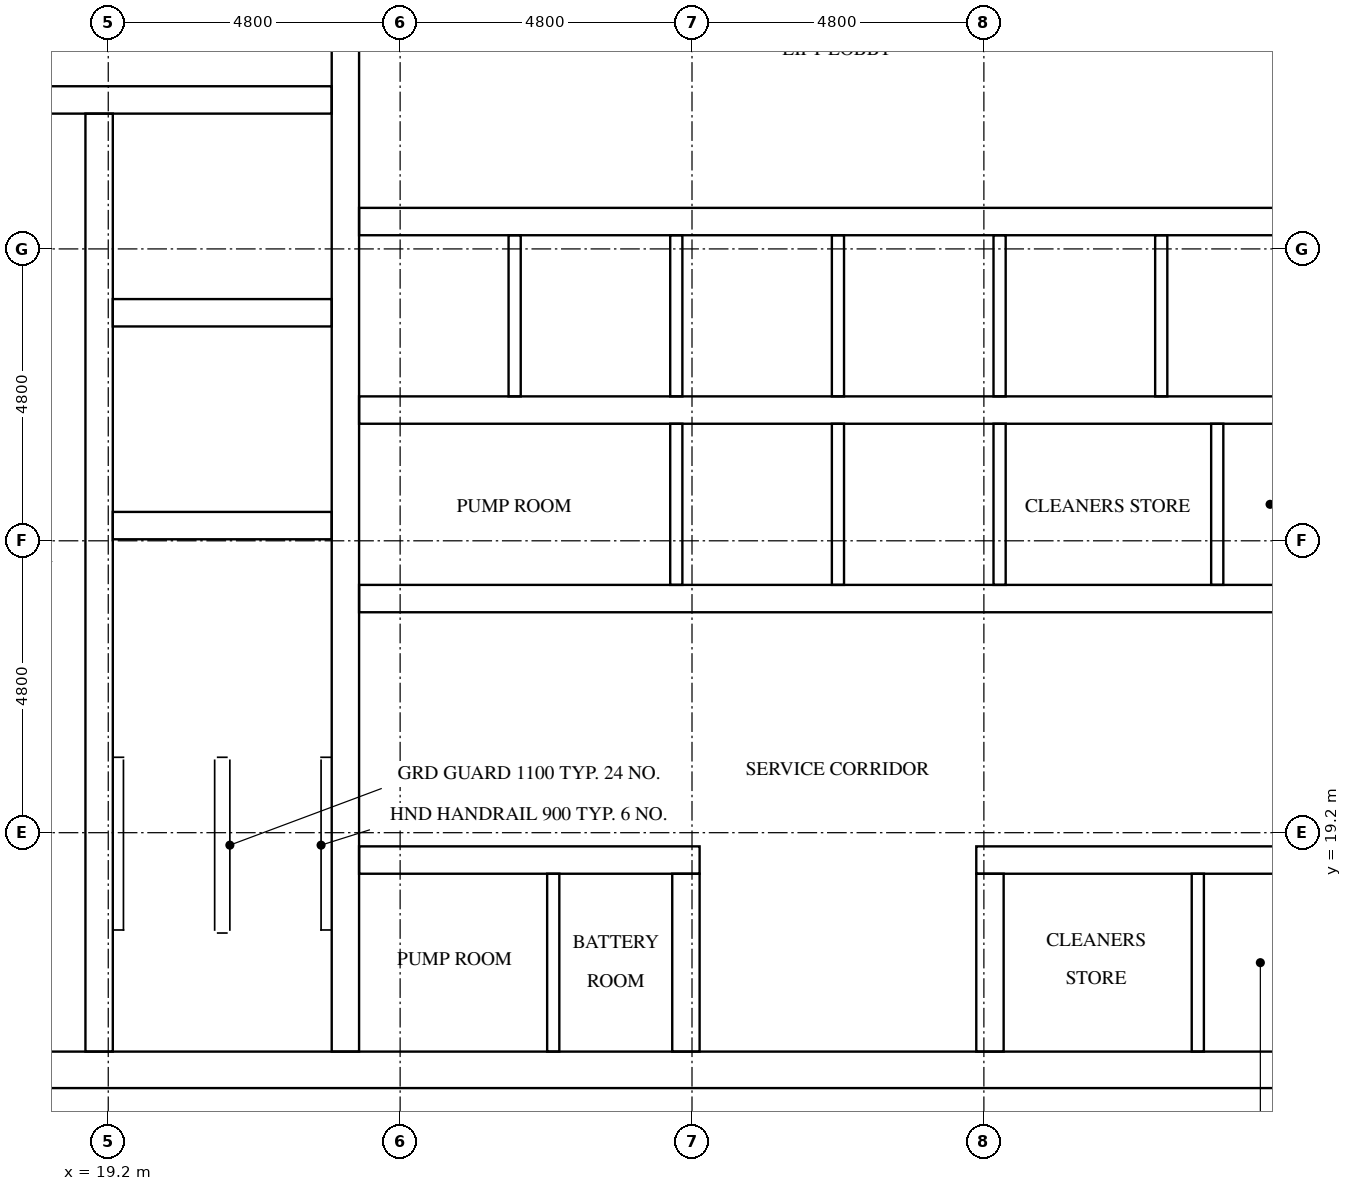
"""IFC4 building model, lengths in metres.
Left out: names, types, materials, properties, quantities, classifications, styles, units other than length and angle.
Written with IfcOpenShell. Run it as: python <this file> out.ifc"""

import sys

from ifc_helpers import new_model, si_unit, direction, frame, frame_2d, origin, place, context, subcontext, project, spatial, rectangle, extrude, element, fill, save


model = new_model("IFC4")
c1 = context("Model", 3, precision=1e-05, world=origin(), true_north=direction((0.0, 1.0)))
c2 = subcontext(c1, "Body", "Model", "MODEL_VIEW")
j1 = project(units=[si_unit("LENGTHUNIT", "METRE"), si_unit("PLANEANGLEUNIT", "RADIAN")], contexts=[c1])
p1 = place(None, origin())
s1 = spatial("IfcSite", under=j1, at=p1, CompositionType="ELEMENT")
p2 = place(p1, origin())
s2 = spatial("IfcBuilding", under=s1, at=p2, CompositionType="ELEMENT")
p3 = place(p2, frame((0.0, 0.0, 238.7)))
s3 = spatial("IfcBuildingStorey", under=s2, at=p3, CompositionType="ELEMENT", Elevation=238.7)
p4 = place(p3, frame((15.0, 15.3, 0.0), z_axis=(0.0, 0.0, 1.0), x_axis=(1.0, 0.0, 0.0)))
e1 = element("IfcWall", 1, at=p4, inside=s3, PredefinedType="SHEAR", context=c2, shape_type="SweptSolid", body=[
    extrude(rectangle(XDim=32.4, YDim=0.6, at=frame_2d((16.2, 0.0))), origin(), (0.0, 0.0, 1.0), 3.2),
])
p5 = place(p4, frame((15.3, 0.0, 0.0)))
e2 = element("IfcOpeningElement", 2, at=p5, cuts=e1, PredefinedType="OPENING", context=c2, shape_type="SweptSolid", body=[
    extrude(rectangle(XDim=1.8, YDim=2.1, at=frame_2d((0.9, 1.05))), frame((0.0, 0.31, 0.0), z_axis=(0.0, -1.0, 0.0), x_axis=(1.0, 0.0, 0.0)), (0.0, 0.0, 1.0), 0.62),
])
p6 = place(p3, frame((19.05, 15.6, 0.0), z_axis=(0.0, 0.0, 1.0), x_axis=(0.0, 1.0, 0.0)))
e3 = element("IfcWall", 3, at=p6, inside=s3, PredefinedType="SHEAR", context=c2, shape_type="SweptSolid", body=[
    extrude(rectangle(XDim=15.425, YDim=0.45, at=frame_2d((7.712, 0.0))), origin(), (0.0, 0.0, 1.0), 3.2),
])
p7 = place(p6, frame((9.85, 0.0, 0.0)))
e4 = element("IfcOpeningElement", 4, at=p7, cuts=e3, PredefinedType="OPENING", context=c2, shape_type="SweptSolid", body=[
    extrude(rectangle(XDim=1.1, YDim=2.1, at=frame_2d((0.55, 1.05))), frame((0.0, 0.235, 0.0), z_axis=(0.0, -1.0, 0.0), x_axis=(1.0, 0.0, 0.0)), (0.0, 0.0, 1.0), 0.47),
])
p8 = place(p6, frame((13.35, 0.0, 0.0)))
e5 = element("IfcOpeningElement", 5, at=p8, cuts=e3, PredefinedType="OPENING", context=c2, shape_type="SweptSolid", body=[
    extrude(rectangle(XDim=1.1, YDim=2.1, at=frame_2d((0.55, 1.05))), frame((0.0, 0.235, 0.0), z_axis=(0.0, -1.0, 0.0), x_axis=(1.0, 0.0, 0.0)), (0.0, 0.0, 1.0), 0.47),
])
p9 = place(p6, frame((0.6, 0.0, 0.0)))
e6 = element("IfcOpeningElement", 6, at=p9, cuts=e3, PredefinedType="OPENING", context=c2, shape_type="SweptSolid", body=[
    extrude(rectangle(XDim=1.2, YDim=2.1, at=frame_2d((0.6, 1.05))), frame((0.0, 0.235, 0.0), z_axis=(0.0, -1.0, 0.0), x_axis=(1.0, 0.0, 0.0)), (0.0, 0.0, 1.0), 0.47),
])
p10 = place(p3, frame((23.1, 15.6, 0.0), z_axis=(0.0, 0.0, 1.0), x_axis=(0.0, 1.0, 0.0)))
e7 = element("IfcWall", 7, at=p10, inside=s3, PredefinedType="SHEAR", context=c2, shape_type="SweptSolid", body=[
    extrude(rectangle(XDim=21.6, YDim=0.45, at=frame_2d((10.8, 0.0))), origin(), (0.0, 0.0, 1.0), 3.2),
])
for number, where, z_axis, x_axis in (
    (8, (19.275, 24.25, 0.0), (0.0, 0.0, 1.0), (1.0, 0.0, 0.0)),
    (9, (19.275, 27.75, 0.0), (0.0, 0.0, 1.0), (1.0, 0.0, 0.0)),
):
    element("IfcWall", number, at=place(p3, frame(where, z_axis=z_axis, x_axis=x_axis)), inside=s3, PredefinedType="SHEAR", context=c2, shape_type="SweptSolid", body=[
        extrude(rectangle(XDim=3.6, YDim=0.45, at=frame_2d((1.8, 0.0))), origin(), (0.0, 0.0, 1.0), 3.2),
    ])
p11 = place(p3, frame((15.6, 31.25, 0.0), z_axis=(0.0, 0.0, 1.0), x_axis=(1.0, 0.0, 0.0)))
e10 = element("IfcWall", 10, at=p11, inside=s3, PredefinedType="SHEAR", context=c2, shape_type="SweptSolid", body=[
    extrude(rectangle(XDim=7.275, YDim=0.45, at=frame_2d((3.637, 0.0))), origin(), (0.0, 0.0, 1.0), 3.2),
])
p12 = place(p3, frame((23.325, 18.75, 0.0), z_axis=(0.0, 0.0, 1.0), x_axis=(1.0, 0.0, 0.0)))
e11 = element("IfcWall", 11, at=p12, inside=s3, PredefinedType="SHEAR", context=c2, shape_type="SweptSolid", body=[
    extrude(rectangle(XDim=5.6, YDim=0.45, at=frame_2d((2.8, 0.0))), origin(), (0.0, 0.0, 1.0), 3.2),
])
p13 = place(p12, frame((1.046, 0.0, 0.0)))
e12 = element("IfcOpeningElement", 12, at=p13, cuts=e11, PredefinedType="OPENING", context=c2, shape_type="SweptSolid", body=[
    extrude(rectangle(XDim=1.0, YDim=2.1, at=frame_2d((0.5, 1.05))), frame((0.0, 0.235, 0.0), z_axis=(0.0, -1.0, 0.0), x_axis=(1.0, 0.0, 0.0)), (0.0, 0.0, 1.0), 0.47),
])
p14 = place(p12, frame((3.721, 0.0, 0.0)))
e13 = element("IfcOpeningElement", 13, at=p14, cuts=e11, PredefinedType="OPENING", context=c2, shape_type="SweptSolid", body=[
    extrude(rectangle(XDim=1.0, YDim=2.1, at=frame_2d((0.5, 1.05))), frame((0.0, 0.235, 0.0), z_axis=(0.0, -1.0, 0.0), x_axis=(1.0, 0.0, 0.0)), (0.0, 0.0, 1.0), 0.47),
])
p15 = place(p3, frame((33.475, 18.75, 0.0), z_axis=(0.0, 0.0, 1.0), x_axis=(1.0, 0.0, 0.0)))
e14 = element("IfcWall", 14, at=p15, inside=s3, PredefinedType="SHEAR", context=c2, shape_type="SweptSolid", body=[
    extrude(rectangle(XDim=5.6, YDim=0.45, at=frame_2d((2.8, 0.0))), origin(), (0.0, 0.0, 1.0), 3.2),
])
p16 = place(p15, frame((1.497, 0.0, 0.0)))
e15 = element("IfcOpeningElement", 15, at=p16, cuts=e14, PredefinedType="OPENING", context=c2, shape_type="SweptSolid", body=[
    extrude(rectangle(XDim=1.0, YDim=2.1, at=frame_2d((0.5, 1.05))), frame((0.0, 0.235, 0.0), z_axis=(0.0, -1.0, 0.0), x_axis=(1.0, 0.0, 0.0)), (0.0, 0.0, 1.0), 0.47),
])
p17 = place(p15, frame((4.171, 0.0, 0.0)))
e16 = element("IfcOpeningElement", 16, at=p17, cuts=e14, PredefinedType="OPENING", context=c2, shape_type="SweptSolid", body=[
    extrude(rectangle(XDim=1.0, YDim=2.1, at=frame_2d((0.5, 1.05))), frame((0.0, 0.235, 0.0), z_axis=(0.0, -1.0, 0.0), x_axis=(1.0, 0.0, 0.0)), (0.0, 0.0, 1.0), 0.47),
])
p18 = place(p3, frame((23.325, 23.05, 0.0), z_axis=(0.0, 0.0, 1.0), x_axis=(1.0, 0.0, 0.0)))
e17 = element("IfcWall", 17, at=p18, inside=s3, PredefinedType="SHEAR", context=c2, shape_type="SweptSolid", body=[
    extrude(rectangle(XDim=15.75, YDim=0.45, at=frame_2d((7.875, 0.0))), origin(), (0.0, 0.0, 1.0), 3.2),
])
p19 = place(p18, frame((2.058, 0.0, 0.0)))
e18 = element("IfcOpeningElement", 18, at=p19, cuts=e17, PredefinedType="OPENING", context=c2, shape_type="SweptSolid", body=[
    extrude(rectangle(XDim=1.0, YDim=2.1, at=frame_2d((0.5, 1.05))), frame((0.0, 0.235, 0.0), z_axis=(0.0, -1.0, 0.0), x_axis=(1.0, 0.0, 0.0)), (0.0, 0.0, 1.0), 0.47),
])
p20 = place(p18, frame((11.823, 0.0, 0.0)))
e19 = element("IfcOpeningElement", 19, at=p20, cuts=e17, PredefinedType="OPENING", context=c2, shape_type="SweptSolid", body=[
    extrude(rectangle(XDim=1.0, YDim=2.1, at=frame_2d((0.5, 1.05))), frame((0.0, 0.235, 0.0), z_axis=(0.0, -1.0, 0.0), x_axis=(1.0, 0.0, 0.0)), (0.0, 0.0, 1.0), 0.47),
])
p21 = place(p18, frame((14.481, 0.0, 0.0)))
e20 = element("IfcOpeningElement", 20, at=p21, cuts=e17, PredefinedType="OPENING", context=c2, shape_type="SweptSolid", body=[
    extrude(rectangle(XDim=1.0, YDim=2.1, at=frame_2d((0.5, 1.05))), frame((0.0, 0.235, 0.0), z_axis=(0.0, -1.0, 0.0), x_axis=(1.0, 0.0, 0.0)), (0.0, 0.0, 1.0), 0.47),
])
p22 = place(p3, frame((23.325, 26.15, 0.0), z_axis=(0.0, 0.0, 1.0), x_axis=(1.0, 0.0, 0.0)))
e21 = element("IfcWall", 21, at=p22, inside=s3, PredefinedType="SHEAR", context=c2, shape_type="SweptSolid", body=[
    extrude(rectangle(XDim=15.75, YDim=0.45, at=frame_2d((7.875, 0.0))), origin(), (0.0, 0.0, 1.0), 3.2),
])
p23 = place(p3, frame((23.325, 29.25, 0.0), z_axis=(0.0, 0.0, 1.0), x_axis=(1.0, 0.0, 0.0)))
e22 = element("IfcWall", 22, at=p23, inside=s3, PredefinedType="SHEAR", context=c2, shape_type="SweptSolid", body=[
    extrude(rectangle(XDim=15.75, YDim=0.45, at=frame_2d((7.875, 0.0))), origin(), (0.0, 0.0, 1.0), 3.2),
])
p24 = place(p23, frame((0.679, 0.0, 0.0)))
e23 = element("IfcOpeningElement", 23, at=p24, cuts=e22, PredefinedType="OPENING", context=c2, shape_type="SweptSolid", body=[
    extrude(rectangle(XDim=1.1, YDim=2.1, at=frame_2d((0.55, 1.05))), frame((0.0, 0.235, 0.0), z_axis=(0.0, -1.0, 0.0), x_axis=(1.0, 0.0, 0.0)), (0.0, 0.0, 1.0), 0.47),
])
p25 = place(p23, frame((3.337, 0.0, 0.0)))
e24 = element("IfcOpeningElement", 24, at=p25, cuts=e22, PredefinedType="OPENING", context=c2, shape_type="SweptSolid", body=[
    extrude(rectangle(XDim=1.1, YDim=2.1, at=frame_2d((0.55, 1.05))), frame((0.0, 0.235, 0.0), z_axis=(0.0, -1.0, 0.0), x_axis=(1.0, 0.0, 0.0)), (0.0, 0.0, 1.0), 0.47),
])
p26 = place(p23, frame((5.996, 0.0, 0.0)))
e25 = element("IfcOpeningElement", 25, at=p26, cuts=e22, PredefinedType="OPENING", context=c2, shape_type="SweptSolid", body=[
    extrude(rectangle(XDim=1.1, YDim=2.1, at=frame_2d((0.55, 1.05))), frame((0.0, 0.235, 0.0), z_axis=(0.0, -1.0, 0.0), x_axis=(1.0, 0.0, 0.0)), (0.0, 0.0, 1.0), 0.47),
])
p27 = place(p23, frame((8.654, 0.0, 0.0)))
e26 = element("IfcOpeningElement", 26, at=p27, cuts=e22, PredefinedType="OPENING", context=c2, shape_type="SweptSolid", body=[
    extrude(rectangle(XDim=1.1, YDim=2.1, at=frame_2d((0.55, 1.05))), frame((0.0, 0.235, 0.0), z_axis=(0.0, -1.0, 0.0), x_axis=(1.0, 0.0, 0.0)), (0.0, 0.0, 1.0), 0.47),
])
p28 = place(p23, frame((11.312, 0.0, 0.0)))
e27 = element("IfcOpeningElement", 27, at=p28, cuts=e22, PredefinedType="OPENING", context=c2, shape_type="SweptSolid", body=[
    extrude(rectangle(XDim=1.1, YDim=2.1, at=frame_2d((0.55, 1.05))), frame((0.0, 0.235, 0.0), z_axis=(0.0, -1.0, 0.0), x_axis=(1.0, 0.0, 0.0)), (0.0, 0.0, 1.0), 0.47),
])
p29 = place(p23, frame((13.971, 0.0, 0.0)))
e28 = element("IfcOpeningElement", 28, at=p29, cuts=e22, PredefinedType="OPENING", context=c2, shape_type="SweptSolid", body=[
    extrude(rectangle(XDim=1.1, YDim=2.1, at=frame_2d((0.55, 1.05))), frame((0.0, 0.235, 0.0), z_axis=(0.0, -1.0, 0.0), x_axis=(1.0, 0.0, 0.0)), (0.0, 0.0, 1.0), 0.47),
])
for number, where, z_axis, x_axis in (
    (29, (28.7, 15.6, 0.0), (0.0, 0.0, 1.0), (0.0, 1.0, 0.0)),
    (30, (33.7, 15.6, 0.0), (0.0, 0.0, 1.0), (0.0, 1.0, 0.0)),
):
    element("IfcWall", number, at=place(p3, frame(where, z_axis=z_axis, x_axis=x_axis)), inside=s3, PredefinedType="SHEAR", context=c2, shape_type="SweptSolid", body=[
        extrude(rectangle(XDim=2.925, YDim=0.45, at=frame_2d((1.462, 0.0))), origin(), (0.0, 0.0, 1.0), 3.2),
    ])
p30 = place(p3, frame((25.883, 26.375, 0.0), z_axis=(0.0, 0.0, 1.0), x_axis=(0.0, 1.0, 0.0)))
e31 = element("IfcWall", 31, at=p30, inside=s3, PredefinedType="SOLIDWALL", context=c2, shape_type="SweptSolid", body=[
    extrude(rectangle(XDim=2.65, YDim=0.2, at=frame_2d((1.325, 0.0))), origin(), (0.0, 0.0, 1.0), 3.2),
])
p31 = place(p3, frame((28.542, 23.275, 0.0), z_axis=(0.0, 0.0, 1.0), x_axis=(0.0, 1.0, 0.0)))
e32 = element("IfcWall", 32, at=p31, inside=s3, PredefinedType="SOLIDWALL", context=c2, shape_type="SweptSolid", body=[
    extrude(rectangle(XDim=2.65, YDim=0.2, at=frame_2d((1.325, 0.0))), origin(), (0.0, 0.0, 1.0), 3.2),
])
p32 = place(p3, frame((28.542, 26.375, 0.0), z_axis=(0.0, 0.0, 1.0), x_axis=(0.0, 1.0, 0.0)))
e33 = element("IfcWall", 33, at=p32, inside=s3, PredefinedType="SOLIDWALL", context=c2, shape_type="SweptSolid", body=[
    extrude(rectangle(XDim=2.65, YDim=0.2, at=frame_2d((1.325, 0.0))), origin(), (0.0, 0.0, 1.0), 3.2),
])
p33 = place(p3, frame((31.2, 23.275, 0.0), z_axis=(0.0, 0.0, 1.0), x_axis=(0.0, 1.0, 0.0)))
e34 = element("IfcWall", 34, at=p33, inside=s3, PredefinedType="SOLIDWALL", context=c2, shape_type="SweptSolid", body=[
    extrude(rectangle(XDim=2.65, YDim=0.2, at=frame_2d((1.325, 0.0))), origin(), (0.0, 0.0, 1.0), 3.2),
])
p34 = place(p3, frame((31.2, 26.375, 0.0), z_axis=(0.0, 0.0, 1.0), x_axis=(0.0, 1.0, 0.0)))
e35 = element("IfcWall", 35, at=p34, inside=s3, PredefinedType="SOLIDWALL", context=c2, shape_type="SweptSolid", body=[
    extrude(rectangle(XDim=2.65, YDim=0.2, at=frame_2d((1.325, 0.0))), origin(), (0.0, 0.0, 1.0), 3.2),
])
p35 = place(p3, frame((33.858, 23.275, 0.0), z_axis=(0.0, 0.0, 1.0), x_axis=(0.0, 1.0, 0.0)))
e36 = element("IfcWall", 36, at=p35, inside=s3, PredefinedType="SOLIDWALL", context=c2, shape_type="SweptSolid", body=[
    extrude(rectangle(XDim=2.65, YDim=0.2, at=frame_2d((1.325, 0.0))), origin(), (0.0, 0.0, 1.0), 3.2),
])
for number, where, z_axis, x_axis in (
    (37, (33.858, 26.375, 0.0), (0.0, 0.0, 1.0), (0.0, 1.0, 0.0)),
    (38, (36.517, 26.375, 0.0), (0.0, 0.0, 1.0), (0.0, 1.0, 0.0)),
):
    element("IfcWall", number, at=place(p3, frame(where, z_axis=z_axis, x_axis=x_axis)), inside=s3, PredefinedType="SOLIDWALL", context=c2, shape_type="SweptSolid", body=[
        extrude(rectangle(XDim=2.65, YDim=0.2, at=frame_2d((1.325, 0.0))), origin(), (0.0, 0.0, 1.0), 3.2),
    ])
p36 = place(p3, frame((37.438, 23.275, 0.0), z_axis=(0.0, 0.0, 1.0), x_axis=(0.0, 1.0, 0.0)))
e39 = element("IfcWall", 39, at=p36, inside=s3, PredefinedType="PARTITIONING", context=c2, shape_type="SweptSolid", body=[
    extrude(rectangle(XDim=2.65, YDim=0.2, at=frame_2d((1.325, 0.0))), origin(), (0.0, 0.0, 1.0), 3.2),
])
for number, where, z_axis, x_axis in (
    (40, (26.518, 15.6, 0.0), (0.0, 0.0, 1.0), (0.0, 1.0, 0.0)),
    (41, (37.118, 15.6, 0.0), (0.0, 0.0, 1.0), (0.0, 1.0, 0.0)),
):
    element("IfcWall", number, at=place(p3, frame(where, z_axis=z_axis, x_axis=x_axis)), inside=s3, PredefinedType="PARTITIONING", context=c2, shape_type="SweptSolid", body=[
        extrude(rectangle(XDim=2.925, YDim=0.2, at=frame_2d((1.462, 0.0))), origin(), (0.0, 0.0, 1.0), 3.2),
    ])
p37 = place(p24, origin())
e42 = element("IfcDoor", 42, at=p37, inside=s3, OperationType="DOUBLE_DOOR_SLIDING", PredefinedType="DOOR", context=c2, shape_type="SweptSolid", body=[
    extrude(rectangle(XDim=1.1, YDim=2.1, at=frame_2d((0.55, 1.05))), frame((0.0, 0.025, 0.0), z_axis=(0.0, -1.0, 0.0), x_axis=(1.0, 0.0, 0.0)), (0.0, 0.0, 1.0), 0.05),
])
fill(e23, e42)
p38 = place(p25, origin())
e43 = element("IfcDoor", 43, at=p38, inside=s3, OperationType="DOUBLE_DOOR_SLIDING", PredefinedType="DOOR", context=c2, shape_type="SweptSolid", body=[
    extrude(rectangle(XDim=1.1, YDim=2.1, at=frame_2d((0.55, 1.05))), frame((0.0, 0.025, 0.0), z_axis=(0.0, -1.0, 0.0), x_axis=(1.0, 0.0, 0.0)), (0.0, 0.0, 1.0), 0.05),
])
fill(e24, e43)
p39 = place(p26, origin())
e44 = element("IfcDoor", 44, at=p39, inside=s3, OperationType="DOUBLE_DOOR_SLIDING", PredefinedType="DOOR", context=c2, shape_type="SweptSolid", body=[
    extrude(rectangle(XDim=1.1, YDim=2.1, at=frame_2d((0.55, 1.05))), frame((0.0, 0.025, 0.0), z_axis=(0.0, -1.0, 0.0), x_axis=(1.0, 0.0, 0.0)), (0.0, 0.0, 1.0), 0.05),
])
fill(e25, e44)
p40 = place(p27, origin())
e45 = element("IfcDoor", 45, at=p40, inside=s3, OperationType="DOUBLE_DOOR_SLIDING", PredefinedType="DOOR", context=c2, shape_type="SweptSolid", body=[
    extrude(rectangle(XDim=1.1, YDim=2.1, at=frame_2d((0.55, 1.05))), frame((0.0, 0.025, 0.0), z_axis=(0.0, -1.0, 0.0), x_axis=(1.0, 0.0, 0.0)), (0.0, 0.0, 1.0), 0.05),
])
fill(e26, e45)
p41 = place(p28, origin())
e46 = element("IfcDoor", 46, at=p41, inside=s3, OperationType="DOUBLE_DOOR_SLIDING", PredefinedType="DOOR", context=c2, shape_type="SweptSolid", body=[
    extrude(rectangle(XDim=1.1, YDim=2.1, at=frame_2d((0.55, 1.05))), frame((0.0, 0.025, 0.0), z_axis=(0.0, -1.0, 0.0), x_axis=(1.0, 0.0, 0.0)), (0.0, 0.0, 1.0), 0.05),
])
fill(e27, e46)
p42 = place(p29, origin())
e47 = element("IfcDoor", 47, at=p42, inside=s3, OperationType="DOUBLE_DOOR_SLIDING", PredefinedType="DOOR", context=c2, shape_type="SweptSolid", body=[
    extrude(rectangle(XDim=1.1, YDim=2.1, at=frame_2d((0.55, 1.05))), frame((0.0, 0.025, 0.0), z_axis=(0.0, -1.0, 0.0), x_axis=(1.0, 0.0, 0.0)), (0.0, 0.0, 1.0), 0.05),
])
fill(e28, e47)
p43 = place(p7, origin())
e48 = element("IfcDoor", 48, at=p43, inside=s3, OperationType="DOUBLE_DOOR_SLIDING", PredefinedType="DOOR", context=c2, shape_type="SweptSolid", body=[
    extrude(rectangle(XDim=1.1, YDim=2.1, at=frame_2d((0.55, 1.05))), frame((0.0, 0.025, 0.0), z_axis=(0.0, -1.0, 0.0), x_axis=(1.0, 0.0, 0.0)), (0.0, 0.0, 1.0), 0.05),
])
fill(e4, e48)
p44 = place(p8, origin())
e49 = element("IfcDoor", 49, at=p44, inside=s3, OperationType="DOUBLE_DOOR_SLIDING", PredefinedType="DOOR", context=c2, shape_type="SweptSolid", body=[
    extrude(rectangle(XDim=1.1, YDim=2.1, at=frame_2d((0.55, 1.05))), frame((0.0, 0.025, 0.0), z_axis=(0.0, -1.0, 0.0), x_axis=(1.0, 0.0, 0.0)), (0.0, 0.0, 1.0), 0.05),
])
fill(e5, e49)
p45 = place(p9, frame((1.2, 0.0, 0.0), z_axis=(0.0, 0.0, 1.0), x_axis=(-1.0, 0.0, 0.0)))
e50 = element("IfcDoor", 50, at=p45, inside=s3, OperationType="SINGLE_SWING_RIGHT", PredefinedType="DOOR", context=c2, shape_type="SweptSolid", body=[
    extrude(rectangle(XDim=1.2, YDim=2.1, at=frame_2d((0.6, 1.05))), frame((0.0, 0.025, 0.0), z_axis=(0.0, -1.0, 0.0), x_axis=(1.0, 0.0, 0.0)), (0.0, 0.0, 1.0), 0.05),
])
fill(e6, e50)
p46 = place(p5, frame((1.8, 0.0, 0.0), z_axis=(0.0, 0.0, 1.0), x_axis=(-1.0, 0.0, 0.0)))
e51 = element("IfcDoor", 51, at=p46, inside=s3, OperationType="DOUBLE_DOOR_SINGLE_SWING", PredefinedType="DOOR", context=c2, shape_type="SweptSolid", body=[
    extrude(rectangle(XDim=1.8, YDim=2.1, at=frame_2d((0.9, 1.05))), frame((0.0, 0.025, 0.0), z_axis=(0.0, -1.0, 0.0), x_axis=(1.0, 0.0, 0.0)), (0.0, 0.0, 1.0), 0.05),
])
fill(e2, e51)
p47 = place(p19, frame((1.0, 0.0, 0.0), z_axis=(0.0, 0.0, 1.0), x_axis=(-1.0, 0.0, 0.0)))
e52 = element("IfcDoor", 52, at=p47, inside=s3, OperationType="SINGLE_SWING_LEFT", PredefinedType="DOOR", context=c2, shape_type="SweptSolid", body=[
    extrude(rectangle(XDim=1.0, YDim=2.1, at=frame_2d((0.5, 1.05))), frame((0.0, 0.025, 0.0), z_axis=(0.0, -1.0, 0.0), x_axis=(1.0, 0.0, 0.0)), (0.0, 0.0, 1.0), 0.05),
])
fill(e18, e52)
p48 = place(p20, frame((1.0, 0.0, 0.0), z_axis=(0.0, 0.0, 1.0), x_axis=(-1.0, 0.0, 0.0)))
e53 = element("IfcDoor", 53, at=p48, inside=s3, OperationType="SINGLE_SWING_RIGHT", PredefinedType="DOOR", context=c2, shape_type="SweptSolid", body=[
    extrude(rectangle(XDim=1.0, YDim=2.1, at=frame_2d((0.5, 1.05))), frame((0.0, 0.025, 0.0), z_axis=(0.0, -1.0, 0.0), x_axis=(1.0, 0.0, 0.0)), (0.0, 0.0, 1.0), 0.05),
])
fill(e19, e53)
p49 = place(p21, frame((1.0, 0.0, 0.0), z_axis=(0.0, 0.0, 1.0), x_axis=(-1.0, 0.0, 0.0)))
e54 = element("IfcDoor", 54, at=p49, inside=s3, OperationType="SINGLE_SWING_LEFT", PredefinedType="DOOR", context=c2, shape_type="SweptSolid", body=[
    extrude(rectangle(XDim=1.0, YDim=2.1, at=frame_2d((0.5, 1.05))), frame((0.0, 0.025, 0.0), z_axis=(0.0, -1.0, 0.0), x_axis=(1.0, 0.0, 0.0)), (0.0, 0.0, 1.0), 0.05),
])
fill(e20, e54)
p50 = place(p13, origin())
e55 = element("IfcDoor", 55, at=p50, inside=s3, OperationType="SINGLE_SWING_RIGHT", PredefinedType="DOOR", context=c2, shape_type="SweptSolid", body=[
    extrude(rectangle(XDim=1.0, YDim=2.1, at=frame_2d((0.5, 1.05))), frame((0.0, 0.025, 0.0), z_axis=(0.0, -1.0, 0.0), x_axis=(1.0, 0.0, 0.0)), (0.0, 0.0, 1.0), 0.05),
])
fill(e12, e55)
p51 = place(p14, origin())
e56 = element("IfcDoor", 56, at=p51, inside=s3, OperationType="SINGLE_SWING_LEFT", PredefinedType="DOOR", context=c2, shape_type="SweptSolid", body=[
    extrude(rectangle(XDim=1.0, YDim=2.1, at=frame_2d((0.5, 1.05))), frame((0.0, 0.025, 0.0), z_axis=(0.0, -1.0, 0.0), x_axis=(1.0, 0.0, 0.0)), (0.0, 0.0, 1.0), 0.05),
])
fill(e13, e56)
p52 = place(p16, origin())
e57 = element("IfcDoor", 57, at=p52, inside=s3, OperationType="SINGLE_SWING_RIGHT", PredefinedType="DOOR", context=c2, shape_type="SweptSolid", body=[
    extrude(rectangle(XDim=1.0, YDim=2.1, at=frame_2d((0.5, 1.05))), frame((0.0, 0.025, 0.0), z_axis=(0.0, -1.0, 0.0), x_axis=(1.0, 0.0, 0.0)), (0.0, 0.0, 1.0), 0.05),
])
fill(e15, e57)
p53 = place(p17, origin())
e58 = element("IfcDoor", 58, at=p53, inside=s3, OperationType="SINGLE_SWING_LEFT", PredefinedType="DOOR", context=c2, shape_type="SweptSolid", body=[
    extrude(rectangle(XDim=1.0, YDim=2.1, at=frame_2d((0.5, 1.05))), frame((0.0, 0.025, 0.0), z_axis=(0.0, -1.0, 0.0), x_axis=(1.0, 0.0, 0.0)), (0.0, 0.0, 1.0), 0.05),
])
fill(e16, e58)
save(model, sys.argv[1])
